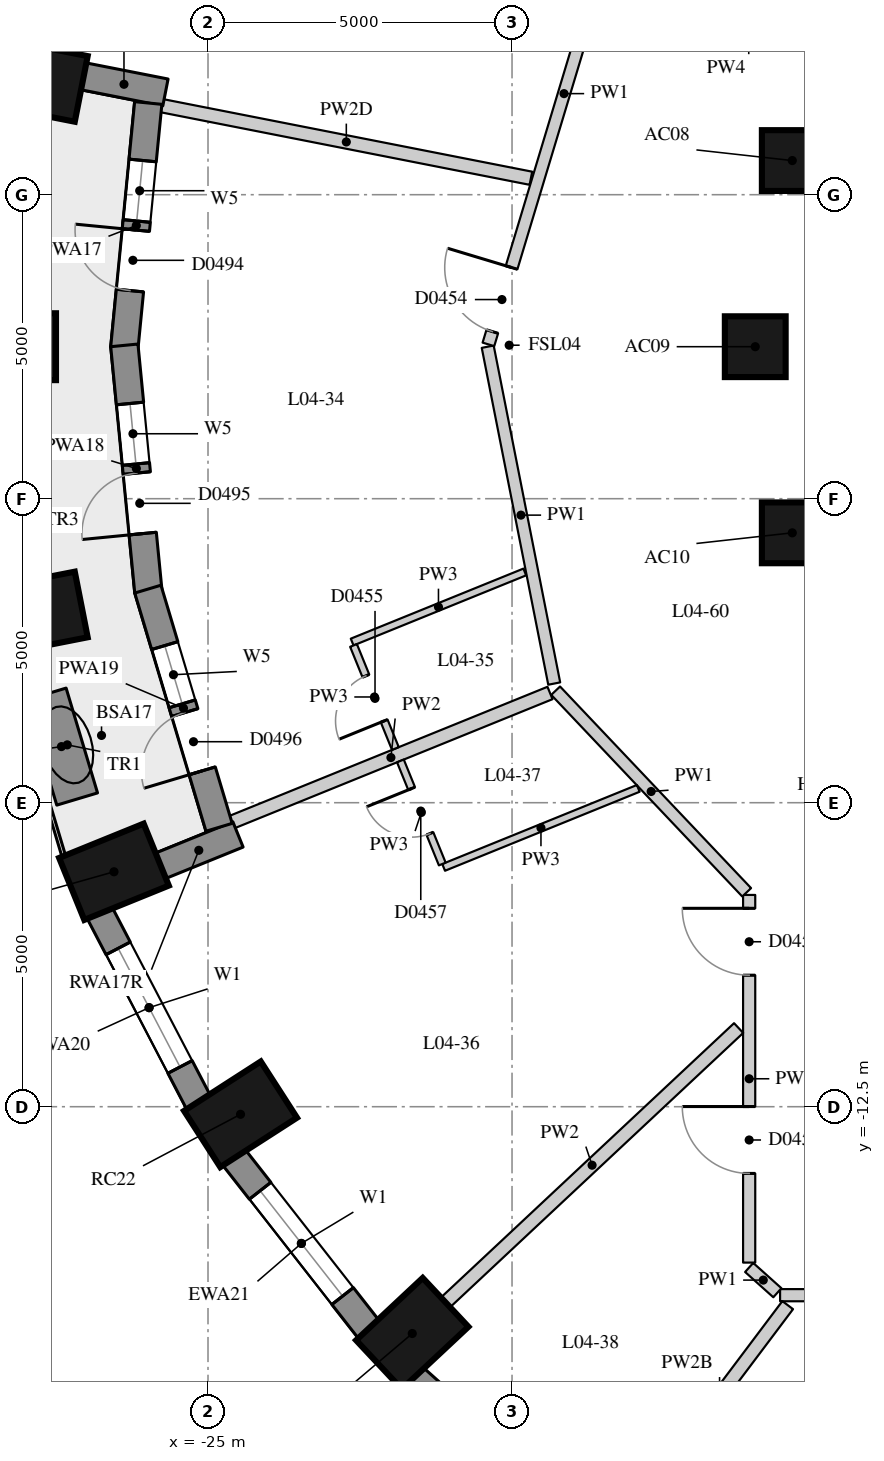
"""IFC4 building model, lengths in metres.
Left out: names, types, materials, properties, quantities, classifications, styles, units other than length and angle.
Written with IfcOpenShell. Run it as: python <this file> out.ifc"""

import sys

from ifc_helpers import new_model, si_unit, direction, frame, frame_2d, origin, origin_2d, place, context, subcontext, project, spatial, rectangle, extrude, element, fill, save


model = new_model("IFC4")
c1 = context("Model", 3, precision=1e-05, world=origin(), true_north=direction((0.0, 1.0)))
c2 = subcontext(c1, "Body", "Model", "MODEL_VIEW")
j1 = project(units=[si_unit("LENGTHUNIT", "METRE"), si_unit("PLANEANGLEUNIT", "RADIAN")], contexts=[c1])
p1 = place(None, origin())
s1 = spatial("IfcSite", under=j1, at=p1, CompositionType="ELEMENT")
p2 = place(p1, origin())
s2 = spatial("IfcBuilding", under=s1, at=p2, CompositionType="ELEMENT")
p3 = place(p2, frame((0.0, 0.0, 21.7)))
s3 = spatial("IfcBuildingStorey", under=s2, at=p3, CompositionType="ELEMENT", Elevation=21.7)
for number, where, z_axis, x_axis in (
    (1, (-27.821, 4.385, 0.0), (0.0, 0.0, 1.0), (-0.981, 0.193, 0.0)),
    (2, (-28.25, 0.0, 0.0), (0.0, 0.0, 1.0), (-1.0, 0.0, 0.0)),
    (3, (-27.821, -4.385, 0.0), (0.0, 0.0, 1.0), (-0.981, -0.193, 0.0)),
    (4, (-26.546, -8.636, 0.0), (0.0, 0.0, 1.0), (-0.927, -0.376, 0.0)),
    (5, (-24.465, -12.625, 0.0), (0.0, 0.0, 1.0), (-0.841, -0.541, 0.0)),
    (6, (-21.641, -16.23, 0.0), (0.0, 0.0, 1.0), (-0.73, -0.683, 0.0)),
):
    element("IfcColumn", number, at=place(p3, frame(where, z_axis=z_axis, x_axis=x_axis)), inside=s3, PredefinedType="COLUMN", context=c2, shape_type="SweptSolid", body=[
        extrude(rectangle(XDim=1.5, YDim=1.1, at=origin_2d()), origin(), (0.0, 0.0, 1.0), 3.3),
    ])
for number, where, z_axis, x_axis in (
    (7, (-15.391, 3.062, 0.0), (0.0, 0.0, 1.0), (1.0, 0.0, 0.0)),
    (8, (-16.0, 0.0, 0.0), (0.0, 0.0, 1.0), (1.0, 0.0, 0.0)),
    (9, (-15.391, -3.062, 0.0), (0.0, 0.0, 1.0), (1.0, 0.0, 0.0)),
):
    element("IfcColumn", number, at=place(p3, frame(where, z_axis=z_axis, x_axis=x_axis)), inside=s3, PredefinedType="COLUMN", context=c2, shape_type="SweptSolid", body=[
        extrude(rectangle(XDim=1.0, YDim=1.0, at=origin_2d()), origin(), (0.0, 0.0, 1.0), 3.3),
    ])
p4 = place(p3, frame((-26.786, -9.305, 0.0), z_axis=(0.0, 0.0, 1.0), x_axis=(0.462492775226, -0.886623050041, 0.0)))
e10 = element("IfcWall", 10, at=p4, inside=s3, PredefinedType="SOLIDWALL", context=c2, shape_type="SweptSolid", body=[
    extrude(rectangle(XDim=3.532, YDim=0.45, at=frame_2d((1.766, 0.0))), origin(), (0.0, 0.0, 1.0), 3.02),
])
p5 = place(p4, frame((0.666, 0.0, 0.4)))
e11 = element("IfcOpeningElement", 11, at=p5, cuts=e10, PredefinedType="OPENING", context=c2, shape_type="SweptSolid", body=[
    extrude(rectangle(XDim=2.2, YDim=1.75, at=frame_2d((1.1, 0.875))), frame((0.0, 0.235, 0.0), z_axis=(0.0, -1.0, 0.0), x_axis=(1.0, 0.0, 0.0)), (0.0, 0.0, 1.0), 0.47),
])
p6 = place(p3, frame((-24.578, -13.328, 0.0), z_axis=(0.0, 0.0, 1.0), x_axis=(0.616661975264, -0.787228053529, 0.0)))
e12 = element("IfcWall", 12, at=p6, inside=s3, PredefinedType="SOLIDWALL", context=c2, shape_type="SweptSolid", body=[
    extrude(rectangle(XDim=3.61, YDim=0.45, at=frame_2d((1.805, 0.0))), origin(), (0.0, 0.0, 1.0), 3.02),
])
p7 = place(p6, frame((0.705, 0.0, 0.4)))
e13 = element("IfcOpeningElement", 13, at=p7, cuts=e12, PredefinedType="OPENING", context=c2, shape_type="SweptSolid", body=[
    extrude(rectangle(XDim=2.2, YDim=1.75, at=frame_2d((1.1, 0.875))), frame((0.0, 0.235, 0.0), z_axis=(0.0, -1.0, 0.0), x_axis=(1.0, 0.0, 0.0)), (0.0, 0.0, 1.0), 0.47),
])
p8 = place(p3, frame((-21.627, -16.943, 0.0), z_axis=(0.0, 0.0, 1.0), x_axis=(0.745526233716, -0.66647628228, 0.0)))
e14 = element("IfcWall", 14, at=p8, inside=s3, PredefinedType="SOLIDWALL", context=c2, shape_type="SweptSolid", body=[
    extrude(rectangle(XDim=3.697, YDim=0.45, at=frame_2d((1.848, 0.0))), origin(), (0.0, 0.0, 1.0), 3.02),
])
p9 = place(p8, frame((0.749, 0.0, 0.4)))
e15 = element("IfcOpeningElement", 15, at=p9, cuts=e14, PredefinedType="OPENING", context=c2, shape_type="SweptSolid", body=[
    extrude(rectangle(XDim=2.2, YDim=1.75, at=frame_2d((1.1, 0.875))), frame((0.0, 0.235, 0.0), z_axis=(0.0, -1.0, 0.0), x_axis=(1.0, 0.0, 0.0)), (0.0, 0.0, 1.0), 0.47),
])
p10 = place(p3, frame((-27.064, 4.45, 0.0), z_axis=(0.0, 0.0, 1.0), x_axis=(0.98123042829, -0.192838913596, 0.0)))
e16 = element("IfcWall", 16, at=p10, inside=s3, PredefinedType="SOLIDWALL", context=c2, shape_type="SweptSolid", body=[
    extrude(rectangle(XDim=1.39, YDim=0.45, at=frame_2d((0.695, 0.0))), origin(), (0.0, 0.0, 1.0), 2.47),
])
p11 = place(p3, frame((-25.796, -8.544, 0.0), z_axis=(0.0, 0.0, 1.0), x_axis=(0.926575599743, 0.376108572039, 0.0)))
e17 = element("IfcWall", 17, at=p11, inside=s3, PredefinedType="SOLIDWALL", context=c2, shape_type="SweptSolid", body=[
    extrude(rectangle(XDim=1.39, YDim=0.45, at=frame_2d((0.695, 0.0))), origin(), (0.0, 0.0, 1.0), 3.02),
])
p12 = place(p3, frame((-25.983, 4.008, 0.0), z_axis=(0.0, 0.0, 1.0), x_axis=(-0.097133468736, -0.995271364629, 0.0)))
e18 = element("IfcWall", 18, at=p12, inside=s3, PredefinedType="SOLIDWALL", context=c2, shape_type="SweptSolid", body=[
    extrude(rectangle(XDim=4.049, YDim=0.45, at=frame_2d((2.024, 0.0))), origin(), (0.0, 0.0, 1.0), 3.02),
])
p13 = place(p12, frame((0.949, 0.0, 0.4)))
e19 = element("IfcOpeningElement", 19, at=p13, cuts=e18, PredefinedType="OPENING", context=c2, shape_type="SweptSolid", body=[
    extrude(rectangle(XDim=1.0, YDim=1.75, at=frame_2d((0.5, 0.875))), frame((0.0, 0.235, 0.0), z_axis=(0.0, -1.0, 0.0), x_axis=(1.0, 0.0, 0.0)), (0.0, 0.0, 1.0), 0.47),
])
p14 = place(p12, frame((2.1, 0.0, 0.0)))
e20 = element("IfcOpeningElement", 20, at=p14, cuts=e18, PredefinedType="OPENING", context=c2, shape_type="SweptSolid", body=[
    extrude(rectangle(XDim=1.0, YDim=2.15, at=frame_2d((0.5, 1.075))), frame((0.0, 0.235, 0.0), z_axis=(0.0, -1.0, 0.0), x_axis=(1.0, 0.0, 0.0)), (0.0, 0.0, 1.0), 0.47),
])
p15 = place(p3, frame((-26.376, 0.022, 0.0), z_axis=(0.0, 0.0, 1.0), x_axis=(0.097092719726, -0.995275340685, 0.0)))
e21 = element("IfcWall", 21, at=p15, inside=s3, PredefinedType="SOLIDWALL", context=c2, shape_type="SweptSolid", body=[
    extrude(rectangle(XDim=4.071, YDim=0.45, at=frame_2d((2.036, 0.0))), origin(), (0.0, 0.0, 1.0), 3.02),
])
p16 = place(p15, frame((0.96, 0.0, 0.4)))
e22 = element("IfcOpeningElement", 22, at=p16, cuts=e21, PredefinedType="OPENING", context=c2, shape_type="SweptSolid", body=[
    extrude(rectangle(XDim=1.0, YDim=1.75, at=frame_2d((0.5, 0.875))), frame((0.0, 0.235, 0.0), z_axis=(0.0, -1.0, 0.0), x_axis=(1.0, 0.0, 0.0)), (0.0, 0.0, 1.0), 0.47),
])
p17 = place(p15, frame((2.111, 0.0, 0.0)))
e23 = element("IfcOpeningElement", 23, at=p17, cuts=e21, PredefinedType="OPENING", context=c2, shape_type="SweptSolid", body=[
    extrude(rectangle(XDim=1.0, YDim=2.15, at=frame_2d((0.5, 1.075))), frame((0.0, 0.235, 0.0), z_axis=(0.0, -1.0, 0.0), x_axis=(1.0, 0.0, 0.0)), (0.0, 0.0, 1.0), 0.47),
])
p18 = place(p3, frame((-25.989, -3.987, 0.0), z_axis=(0.0, 0.0, 1.0), x_axis=(0.286427456555, -0.958101932015, 0.0)))
e24 = element("IfcWall", 24, at=p18, inside=s3, PredefinedType="SOLIDWALL", context=c2, shape_type="SweptSolid", body=[
    extrude(rectangle(XDim=4.089, YDim=0.45, at=frame_2d((2.044, 0.0))), origin(), (0.0, 0.0, 1.0), 3.02),
])
p19 = place(p18, frame((0.969, 0.0, 0.4)))
e25 = element("IfcOpeningElement", 25, at=p19, cuts=e24, PredefinedType="OPENING", context=c2, shape_type="SweptSolid", body=[
    extrude(rectangle(XDim=1.0, YDim=1.75, at=frame_2d((0.5, 0.875))), frame((0.0, 0.235, 0.0), z_axis=(0.0, -1.0, 0.0), x_axis=(1.0, 0.0, 0.0)), (0.0, 0.0, 1.0), 0.47),
])
p20 = place(p18, frame((2.119, 0.0, 0.0)))
e26 = element("IfcOpeningElement", 26, at=p20, cuts=e24, PredefinedType="OPENING", context=c2, shape_type="SweptSolid", body=[
    extrude(rectangle(XDim=1.0, YDim=2.15, at=frame_2d((0.5, 1.075))), frame((0.0, 0.235, 0.0), z_axis=(0.0, -1.0, 0.0), x_axis=(1.0, 0.0, 0.0)), (0.0, 0.0, 1.0), 0.47),
])
p21 = place(p3, frame((-27.669, -5.715, 0.0), z_axis=(0.0, 0.0, 1.0), x_axis=(0.287024312863, -0.957923297465, 0.0)))
e27 = element("IfcWall", 27, at=p21, inside=s3, PredefinedType="USERDEFINED", context=c2, shape_type="SweptSolid", body=[
    extrude(rectangle(XDim=1.8, YDim=0.7, at=frame_2d((0.9, 0.0))), origin(), (0.0, 0.0, 1.0), 0.75),
])
p22 = place(p3, frame((-7.92, -15.6, 0.0), z_axis=(0.0, 0.0, 1.0), x_axis=(-1.0, 0.0, 0.0)))
e28 = element("IfcWall", 28, at=p22, inside=s3, PredefinedType="PARTITIONING", context=c2, shape_type="SweptSolid", body=[
    extrude(rectangle(XDim=7.672, YDim=0.2, at=frame_2d((3.836, 0.0))), origin(), (0.0, 0.0, 1.0), 3.02),
])
p23 = place(p22, frame((5.537, 0.0, 0.0)))
e29 = element("IfcOpeningElement", 29, at=p23, cuts=e28, PredefinedType="OPENING", context=c2, shape_type="SweptSolid", body=[
    extrude(rectangle(XDim=1.0, YDim=2.1, at=frame_2d((0.5, 1.05))), frame((0.0, 0.11, 0.0), z_axis=(0.0, -1.0, 0.0), x_axis=(1.0, 0.0, 0.0)), (0.0, 0.0, 1.0), 0.22),
])
p24 = place(p22, frame((1.036, 0.0, 0.0)))
e30 = element("IfcOpeningElement", 30, at=p24, cuts=e28, PredefinedType="OPENING", context=c2, shape_type="SweptSolid", body=[
    extrude(rectangle(XDim=0.9, YDim=2.1, at=frame_2d((0.45, 1.05))), frame((0.0, 0.11, 0.0), z_axis=(0.0, -1.0, 0.0), x_axis=(1.0, 0.0, 0.0)), (0.0, 0.0, 1.0), 0.22),
])
p25 = place(p3, frame((-15.636, -15.56, 0.0), z_axis=(0.0, 0.0, 1.0), x_axis=(-0.744656758283, 0.667447610187, 0.0)))
e31 = element("IfcWall", 31, at=p25, inside=s3, PredefinedType="PARTITIONING", context=c2, shape_type="SweptSolid", body=[
    extrude(rectangle(XDim=0.623, YDim=0.2, at=frame_2d((0.312, 0.0))), origin(), (0.0, 0.0, 1.0), 3.02),
])
p26 = place(p3, frame((-16.1, -15.064, 0.0), z_axis=(0.0, 0.0, 1.0), x_axis=(0.0, 1.0, 0.0)))
e32 = element("IfcWall", 32, at=p26, inside=s3, PredefinedType="PARTITIONING", context=c2, shape_type="SweptSolid", body=[
    extrude(rectangle(XDim=6.047, YDim=0.2, at=frame_2d((3.023, 0.0))), origin(), (0.0, 0.0, 1.0), 3.02),
])
p27 = place(p26, frame((4.727, 0.0, 0.0)))
e33 = element("IfcOpeningElement", 33, at=p27, cuts=e32, PredefinedType="OPENING", context=c2, shape_type="SweptSolid", body=[
    extrude(rectangle(XDim=1.1, YDim=2.1, at=frame_2d((0.55, 1.05))), frame((0.0, 0.11, 0.0), z_axis=(0.0, -1.0, 0.0), x_axis=(1.0, 0.0, 0.0)), (0.0, 0.0, 1.0), 0.22),
])
p28 = place(p26, frame((1.467, 0.0, 0.0)))
e34 = element("IfcOpeningElement", 34, at=p28, cuts=e32, PredefinedType="OPENING", context=c2, shape_type="SweptSolid", body=[
    extrude(rectangle(XDim=1.1, YDim=2.1, at=frame_2d((0.55, 1.05))), frame((0.0, 0.11, 0.0), z_axis=(0.0, -1.0, 0.0), x_axis=(1.0, 0.0, 0.0)), (0.0, 0.0, 1.0), 0.22),
])
p29 = place(p3, frame((-16.141, -8.974, 0.0), z_axis=(0.0, 0.0, 1.0), x_axis=(-0.687741683024, 0.725955492735, 0.0)))
e35 = element("IfcWall", 35, at=p29, inside=s3, PredefinedType="PARTITIONING", context=c2, shape_type="SweptSolid", body=[
    extrude(rectangle(XDim=4.568, YDim=0.2, at=frame_2d((2.284, 0.0))), origin(), (0.0, 0.0, 1.0), 3.02),
])
p30 = place(p3, frame((-19.306, -5.541, 0.0), z_axis=(0.0, 0.0, 1.0), x_axis=(-0.193671356151, 0.981066463501, 0.0)))
e36 = element("IfcWall", 36, at=p30, inside=s3, PredefinedType="PARTITIONING", context=c2, shape_type="SweptSolid", body=[
    extrude(rectangle(XDim=5.647, YDim=0.2, at=frame_2d((2.824, 0.0))), origin(), (0.0, 0.0, 1.0), 3.02),
])
p31 = place(p3, frame((-20.388, 0.038, 0.0), z_axis=(0.0, 0.0, 1.0), x_axis=(0.288600779805, 0.957449523419, 0.0)))
e37 = element("IfcWall", 37, at=p31, inside=s3, PredefinedType="PARTITIONING", context=c2, shape_type="SweptSolid", body=[
    extrude(rectangle(XDim=8.615, YDim=0.2, at=frame_2d((4.308, 0.0))), origin(), (0.0, 0.0, 1.0), 3.02),
])
p32 = place(p31, frame((7.295, 0.0, 0.0)))
e38 = element("IfcOpeningElement", 38, at=p32, cuts=e37, PredefinedType="OPENING", context=c2, shape_type="SweptSolid", body=[
    extrude(rectangle(XDim=1.1, YDim=2.1, at=frame_2d((0.55, 1.05))), frame((0.0, 0.11, 0.0), z_axis=(0.0, -1.0, 0.0), x_axis=(1.0, 0.0, 0.0)), (0.0, 0.0, 1.0), 0.22),
])
p33 = place(p31, frame((0.22, 0.0, 0.0)))
e39 = element("IfcOpeningElement", 39, at=p33, cuts=e37, PredefinedType="OPENING", context=c2, shape_type="SweptSolid", body=[
    extrude(rectangle(XDim=1.1, YDim=2.1, at=frame_2d((0.55, 1.05))), frame((0.0, 0.11, 0.0), z_axis=(0.0, -1.0, 0.0), x_axis=(1.0, 0.0, 0.0)), (0.0, 0.0, 1.0), 0.22),
])
p34 = place(p3, frame((-25.761, 3.964, 0.0), z_axis=(0.0, 0.0, 1.0), x_axis=(0.981209888948, -0.192943395406, 0.0)))
e40 = element("IfcWall", 40, at=p34, inside=s3, PredefinedType="PARTITIONING", context=c2, shape_type="SweptSolid", body=[
    extrude(rectangle(XDim=6.188, YDim=0.22, at=frame_2d((3.094, 0.0))), origin(), (0.0, 0.0, 1.0), 2.47),
])
p35 = place(p3, frame((-24.608, -7.82, 0.0), z_axis=(0.0, 0.0, 1.0), x_axis=(0.926565467624, 0.376133532415, 0.0)))
e41 = element("IfcWall", 41, at=p35, inside=s3, PredefinedType="PARTITIONING", context=c2, shape_type="SweptSolid", body=[
    extrude(rectangle(XDim=5.648, YDim=0.22, at=frame_2d((2.824, 0.0))), origin(), (0.0, 0.0, 1.0), 3.02),
])
p36 = place(p3, frame((-21.093, -15.718, 0.0), z_axis=(0.0, 0.0, 1.0), x_axis=(0.73009284205, 0.683347965525, 0.0)))
e42 = element("IfcWall", 42, at=p36, inside=s3, PredefinedType="PARTITIONING", context=c2, shape_type="SweptSolid", body=[
    extrude(rectangle(XDim=6.602, YDim=0.22, at=frame_2d((3.301, 0.0))), origin(), (0.0, 0.0, 1.0), 3.02),
])
p37 = place(p3, frame((-17.708, -18.743, 0.0), z_axis=(0.0, 0.0, 1.0), x_axis=(0.601172757903, 0.799119086967, 0.0)))
e43 = element("IfcWall", 43, at=p37, inside=s3, PredefinedType="PARTITIONING", context=c2, shape_type="SweptSolid", body=[
    extrude(rectangle(XDim=3.729, YDim=0.22, at=frame_2d((1.864, 0.0))), origin(), (0.0, 0.0, 1.0), 2.57),
])
p38 = place(p3, frame((-19.79, -3.705, 0.0), z_axis=(0.0, 0.0, 1.0), x_axis=(-0.926585481443, -0.37608422671, 0.0)))
e44 = element("IfcWall", 44, at=p38, inside=s3, PredefinedType="PARTITIONING", context=c2, shape_type="SweptSolid", body=[
    extrude(rectangle(XDim=3.064, YDim=0.12, at=frame_2d((1.532, 0.0))), origin(), (0.0, 0.0, 1.0), 3.02),
])
p39 = place(p3, frame((-17.924, -7.264, 0.0), z_axis=(0.0, 0.0, 1.0), x_axis=(-0.926548953408, -0.376174210891, 0.0)))
e45 = element("IfcWall", 45, at=p39, inside=s3, PredefinedType="PARTITIONING", context=c2, shape_type="SweptSolid", body=[
    extrude(rectangle(XDim=3.455, YDim=0.12, at=frame_2d((1.727, 0.0))), origin(), (0.0, 0.0, 1.0), 3.02),
])
p40 = place(p3, frame((-22.607, -4.913, 0.0), z_axis=(0.0, 0.0, 1.0), x_axis=(0.376216010002, -0.92653198208, 0.0)))
e46 = element("IfcWall", 46, at=p40, inside=s3, PredefinedType="PARTITIONING", context=c2, shape_type="SweptSolid", body=[
    extrude(rectangle(XDim=1.83, YDim=0.12, at=frame_2d((0.915, 0.0))), origin(), (0.0, 0.0, 1.0), 3.02),
])
p41 = place(p40, frame((0.54, 0.0, 0.0)))
e47 = element("IfcOpeningElement", 47, at=p41, cuts=e46, PredefinedType="OPENING", context=c2, shape_type="SweptSolid", body=[
    extrude(rectangle(XDim=0.8, YDim=2.1, at=frame_2d((0.4, 1.05))), frame((0.0, 0.07, 0.0), z_axis=(0.0, -1.0, 0.0), x_axis=(1.0, 0.0, 0.0)), (0.0, 0.0, 1.0), 0.14),
])
p42 = place(p3, frame((-21.147, -8.508, 0.0), z_axis=(0.0, 0.0, 1.0), x_axis=(-0.376216010002, 0.92653198208, 0.0)))
e48 = element("IfcWall", 48, at=p42, inside=s3, PredefinedType="PARTITIONING", context=c2, shape_type="SweptSolid", body=[
    extrude(rectangle(XDim=1.83, YDim=0.12, at=frame_2d((0.915, 0.0))), origin(), (0.0, 0.0, 1.0), 3.02),
])
p43 = place(p42, frame((0.54, 0.0, 0.0)))
e49 = element("IfcOpeningElement", 49, at=p43, cuts=e48, PredefinedType="OPENING", context=c2, shape_type="SweptSolid", body=[
    extrude(rectangle(XDim=0.8, YDim=2.1, at=frame_2d((0.4, 1.05))), frame((0.0, 0.07, 0.0), z_axis=(0.0, -1.0, 0.0), x_axis=(1.0, 0.0, 0.0)), (0.0, 0.0, 1.0), 0.14),
])
p44 = place(p5, origin())
e50 = element("IfcWindow", 50, at=p44, inside=s3, PartitioningType="SINGLE_PANEL", PredefinedType="WINDOW", context=c2, shape_type="SweptSolid", body=[
    extrude(rectangle(XDim=2.2, YDim=1.75, at=frame_2d((1.1, 0.875))), frame((0.0, 0.035, 0.0), z_axis=(0.0, -1.0, 0.0), x_axis=(1.0, 0.0, 0.0)), (0.0, 0.0, 1.0), 0.06),
])
fill(e11, e50)
p45 = place(p7, origin())
e51 = element("IfcWindow", 51, at=p45, inside=s3, PartitioningType="SINGLE_PANEL", PredefinedType="WINDOW", context=c2, shape_type="SweptSolid", body=[
    extrude(rectangle(XDim=2.2, YDim=1.75, at=frame_2d((1.1, 0.875))), frame((0.0, 0.035, 0.0), z_axis=(0.0, -1.0, 0.0), x_axis=(1.0, 0.0, 0.0)), (0.0, 0.0, 1.0), 0.06),
])
fill(e13, e51)
p46 = place(p13, origin())
e52 = element("IfcWindow", 52, at=p46, inside=s3, PartitioningType="SINGLE_PANEL", PredefinedType="WINDOW", context=c2, shape_type="SweptSolid", body=[
    extrude(rectangle(XDim=1.0, YDim=1.75, at=frame_2d((0.5, 0.875))), frame((0.0, 0.035, 0.0), z_axis=(0.0, -1.0, 0.0), x_axis=(1.0, 0.0, 0.0)), (0.0, 0.0, 1.0), 0.06),
])
fill(e19, e52)
p47 = place(p14, frame((1.0, 0.0, 0.0), z_axis=(0.0, 0.0, 1.0), x_axis=(-1.0, 0.0, 0.0)))
e53 = element("IfcDoor", 53, at=p47, inside=s3, OperationType="SINGLE_SWING_RIGHT", PredefinedType="DOOR", context=c2, shape_type="SweptSolid", body=[
    extrude(rectangle(XDim=1.0, YDim=2.15, at=frame_2d((0.5, 1.075))), frame((0.0, 0.075, 0.0), z_axis=(0.0, -1.0, 0.0), x_axis=(1.0, 0.0, 0.0)), (0.0, 0.0, 1.0), 0.05),
])
fill(e20, e53)
p48 = place(p16, origin())
e54 = element("IfcWindow", 54, at=p48, inside=s3, PartitioningType="SINGLE_PANEL", PredefinedType="WINDOW", context=c2, shape_type="SweptSolid", body=[
    extrude(rectangle(XDim=1.0, YDim=1.75, at=frame_2d((0.5, 0.875))), frame((0.0, 0.035, 0.0), z_axis=(0.0, -1.0, 0.0), x_axis=(1.0, 0.0, 0.0)), (0.0, 0.0, 1.0), 0.06),
])
fill(e22, e54)
p49 = place(p17, frame((1.0, 0.0, 0.0), z_axis=(0.0, 0.0, 1.0), x_axis=(-1.0, 0.0, 0.0)))
e55 = element("IfcDoor", 55, at=p49, inside=s3, OperationType="SINGLE_SWING_LEFT", PredefinedType="DOOR", context=c2, shape_type="SweptSolid", body=[
    extrude(rectangle(XDim=1.0, YDim=2.15, at=frame_2d((0.5, 1.075))), frame((0.0, 0.075, 0.0), z_axis=(0.0, -1.0, 0.0), x_axis=(1.0, 0.0, 0.0)), (0.0, 0.0, 1.0), 0.05),
])
fill(e23, e55)
p50 = place(p19, origin())
e56 = element("IfcWindow", 56, at=p50, inside=s3, PartitioningType="SINGLE_PANEL", PredefinedType="WINDOW", context=c2, shape_type="SweptSolid", body=[
    extrude(rectangle(XDim=1.0, YDim=1.75, at=frame_2d((0.5, 0.875))), frame((0.0, 0.035, 0.0), z_axis=(0.0, -1.0, 0.0), x_axis=(1.0, 0.0, 0.0)), (0.0, 0.0, 1.0), 0.06),
])
fill(e25, e56)
p51 = place(p20, frame((1.0, 0.0, 0.0), z_axis=(0.0, 0.0, 1.0), x_axis=(-1.0, 0.0, 0.0)))
e57 = element("IfcDoor", 57, at=p51, inside=s3, OperationType="SINGLE_SWING_LEFT", PredefinedType="DOOR", context=c2, shape_type="SweptSolid", body=[
    extrude(rectangle(XDim=1.0, YDim=2.15, at=frame_2d((0.5, 1.075))), frame((0.0, 0.075, 0.0), z_axis=(0.0, -1.0, 0.0), x_axis=(1.0, 0.0, 0.0)), (0.0, 0.0, 1.0), 0.05),
])
fill(e26, e57)
p52 = place(p33, origin())
e58 = element("IfcDoor", 58, at=p52, inside=s3, OperationType="SINGLE_SWING_RIGHT", PredefinedType="DOOR", context=c2, shape_type="SweptSolid", body=[
    extrude(rectangle(XDim=1.1, YDim=2.1, at=frame_2d((0.55, 1.05))), frame((0.0, 0.025, 0.0), z_axis=(0.0, -1.0, 0.0), x_axis=(1.0, 0.0, 0.0)), (0.0, 0.0, 1.0), 0.05),
])
fill(e39, e58)
p53 = place(p41, origin())
e59 = element("IfcDoor", 59, at=p53, inside=s3, OperationType="SINGLE_SWING_LEFT", PredefinedType="DOOR", context=c2, shape_type="SweptSolid", body=[
    extrude(rectangle(XDim=0.8, YDim=2.1, at=frame_2d((0.4, 1.05))), frame((0.0, 0.025, 0.0), z_axis=(0.0, -1.0, 0.0), x_axis=(1.0, 0.0, 0.0)), (0.0, 0.0, 1.0), 0.05),
])
fill(e47, e59)
p54 = place(p27, origin())
e60 = element("IfcDoor", 60, at=p54, inside=s3, OperationType="SINGLE_SWING_RIGHT", PredefinedType="DOOR", context=c2, shape_type="SweptSolid", body=[
    extrude(rectangle(XDim=1.1, YDim=2.1, at=frame_2d((0.55, 1.05))), frame((0.0, 0.025, 0.0), z_axis=(0.0, -1.0, 0.0), x_axis=(1.0, 0.0, 0.0)), (0.0, 0.0, 1.0), 0.05),
])
fill(e33, e60)
p55 = place(p43, origin())
e61 = element("IfcDoor", 61, at=p55, inside=s3, OperationType="SINGLE_SWING_RIGHT", PredefinedType="DOOR", context=c2, shape_type="SweptSolid", body=[
    extrude(rectangle(XDim=0.8, YDim=2.1, at=frame_2d((0.4, 1.05))), frame((0.0, 0.025, 0.0), z_axis=(0.0, -1.0, 0.0), x_axis=(1.0, 0.0, 0.0)), (0.0, 0.0, 1.0), 0.05),
])
fill(e49, e61)
p56 = place(p28, origin())
e62 = element("IfcDoor", 62, at=p56, inside=s3, OperationType="SINGLE_SWING_RIGHT", PredefinedType="DOOR", context=c2, shape_type="SweptSolid", body=[
    extrude(rectangle(XDim=1.1, YDim=2.1, at=frame_2d((0.55, 1.05))), frame((0.0, 0.025, 0.0), z_axis=(0.0, -1.0, 0.0), x_axis=(1.0, 0.0, 0.0)), (0.0, 0.0, 1.0), 0.05),
])
fill(e34, e62)
save(model, sys.argv[1])
